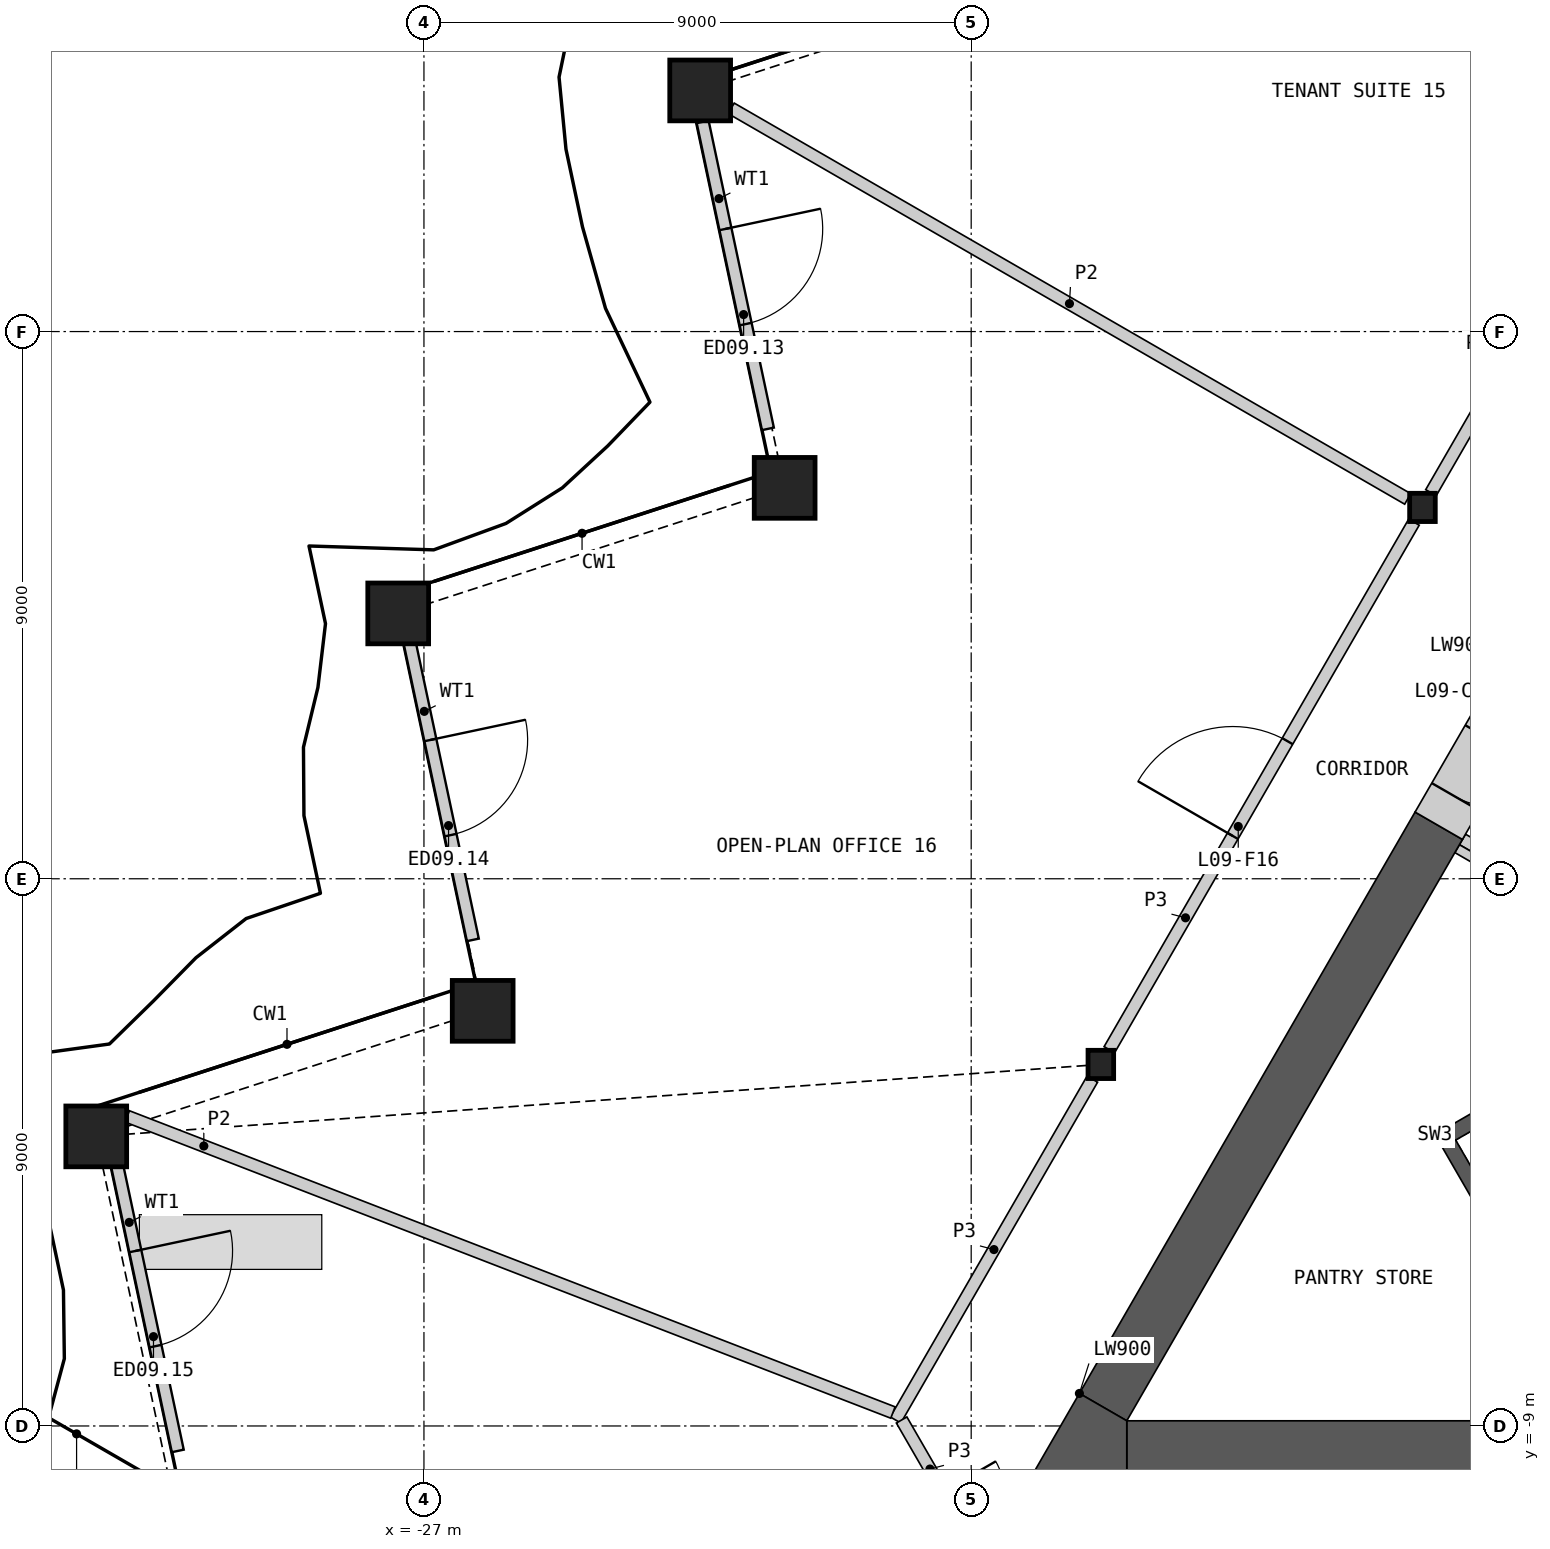
"""IFC4 building model, lengths in metres.
Left out: names, types, materials, properties, quantities, classifications, styles, units other than length and angle.
Written with IfcOpenShell. Run it as: python <this file> out.ifc"""

import sys

from ifc_helpers import new_model, si_unit, direction, frame, frame_2d, origin, origin_2d, place, context, subcontext, project, spatial, polyline, rectangle, hollow_rectangle, i_section, outline, extrude, element, fill, save


model = new_model("IFC4")
c1 = context("Model", 3, precision=1e-05, world=origin(), true_north=direction((0.0, 1.0)))
c2 = subcontext(c1, "Body", "Model", "MODEL_VIEW")
j1 = project(units=[si_unit("LENGTHUNIT", "METRE"), si_unit("PLANEANGLEUNIT", "RADIAN")], contexts=[c1])
p1 = place(None, origin())
s1 = spatial("IfcSite", under=j1, at=p1, CompositionType="ELEMENT")
p2 = place(p1, origin())
s2 = spatial("IfcBuilding", under=s1, at=p2, CompositionType="ELEMENT")
p3 = place(p2, frame((0.0, 0.0, 46.8)))
s3 = spatial("IfcBuildingStorey", under=s2, at=p3, CompositionType="ELEMENT", Elevation=46.8)
for number, where, z_axis, x_axis in (
    (1, (-22.457, 12.966, 0.0), (0.0, 0.0, 1.0), (1.0, 0.0, 0.0)),
    (2, (-21.068, 6.429, 0.0), (0.0, 0.0, 1.0), (1.0, 0.0, 0.0)),
    (3, (-27.423, 4.364, 0.0), (0.0, 0.0, 1.0), (1.0, 0.0, 0.0)),
    (4, (-26.034, -2.172, 0.0), (0.0, 0.0, 1.0), (1.0, 0.0, 0.0)),
    (5, (-32.389, -4.237, 0.0), (0.0, 0.0, 1.0), (1.0, 0.0, 0.0)),
):
    element("IfcColumn", number, at=place(p3, frame(where, z_axis=z_axis, x_axis=x_axis)), inside=s3, PredefinedType="COLUMN", context=c2, shape_type="SweptSolid", body=[
        extrude(hollow_rectangle(XDim=1.0, YDim=1.0, WallThickness=0.07, at=origin_2d()), origin(), (0.0, 0.0, 1.0), 4.2),
    ])
for number, where, z_axis, x_axis in (
    (6, (-10.578, 6.107, 0.0), (0.0, 0.0, 1.0), (1.0, 0.0, 0.0)),
    (7, (-15.868, -3.054, 0.0), (0.0, 0.0, 1.0), (1.0, 0.0, 0.0)),
):
    element("IfcColumn", number, at=place(p3, frame(where, z_axis=z_axis, x_axis=x_axis)), inside=s3, PredefinedType="COLUMN", context=c2, shape_type="SweptSolid", body=[
        extrude(i_section(OverallWidth=0.421, OverallDepth=0.465, WebThickness=0.045, FlangeThickness=0.072, at=origin_2d()), origin(), (0.0, 0.0, 1.0), 4.2),
    ])
p4 = place(p3, frame((-22.416, 12.449, 0.0), z_axis=(0.0, 0.0, 1.0), x_axis=(0.207907400709, -0.978148512615, 0.0)))
e8 = element("IfcWall", 8, at=p4, inside=s3, PredefinedType="SOLIDWALL", context=c2, shape_type="SweptSolid", body=[
    extrude(rectangle(XDim=5.162, YDim=0.2, at=frame_2d((2.581, 0.0))), origin(), (0.0, 0.0, 1.0), 3.189),
])
p5 = place(p4, frame((1.8, 0.0, 0.0)))
e9 = element("IfcOpeningElement", 9, at=p5, cuts=e8, PredefinedType="OPENING", context=c2, shape_type="SweptSolid", body=[
    extrude(rectangle(XDim=1.6, YDim=2.4, at=frame_2d((0.8, 1.2))), frame((0.0, 0.11, 0.0), z_axis=(0.0, -1.0, 0.0), x_axis=(1.0, 0.0, 0.0)), (0.0, 0.0, 1.0), 0.22),
])
p6 = place(p3, frame((-27.261, 4.006, 0.0), z_axis=(0.0, 0.0, 1.0), x_axis=(0.207885539143, -0.978153159079, 0.0)))
e10 = element("IfcWall", 10, at=p6, inside=s3, PredefinedType="SOLIDWALL", context=c2, shape_type="SweptSolid", body=[
    extrude(rectangle(XDim=5.124, YDim=0.2, at=frame_2d((2.562, 0.0))), origin(), (0.0, 0.0, 1.0), 3.189),
])
p7 = place(p6, frame((1.762, 0.0, 0.0)))
e11 = element("IfcOpeningElement", 11, at=p7, cuts=e10, PredefinedType="OPENING", context=c2, shape_type="SweptSolid", body=[
    extrude(rectangle(XDim=1.6, YDim=2.4, at=frame_2d((0.8, 1.2))), frame((0.0, 0.11, 0.0), z_axis=(0.0, -1.0, 0.0), x_axis=(1.0, 0.0, 0.0)), (0.0, 0.0, 1.0), 0.22),
])
p8 = place(p3, frame((-32.114, -4.399, 0.0), z_axis=(0.0, 0.0, 1.0), x_axis=(0.207931126702, -0.978143469307, 0.0)))
e12 = element("IfcWall", 12, at=p8, inside=s3, PredefinedType="SOLIDWALL", context=c2, shape_type="SweptSolid", body=[
    extrude(rectangle(XDim=5.124, YDim=0.2, at=frame_2d((2.562, 0.0))), origin(), (0.0, 0.0, 1.0), 3.189),
])
p9 = place(p8, frame((1.762, 0.0, 0.0)))
e13 = element("IfcOpeningElement", 13, at=p9, cuts=e12, PredefinedType="OPENING", context=c2, shape_type="SweptSolid", body=[
    extrude(rectangle(XDim=1.6, YDim=2.4, at=frame_2d((0.8, 1.2))), frame((0.0, 0.11, 0.0), z_axis=(0.0, -1.0, 0.0), x_axis=(1.0, 0.0, 0.0)), (0.0, 0.0, 1.0), 0.22),
])
p10 = place(p3, frame((-8.181, -0.357, 0.0), z_axis=(0.0, 0.0, 1.0), x_axis=(-0.866035824272, 0.499981950752, 0.0)))
e14 = element("IfcWall", 14, at=p10, inside=s3, PredefinedType="SHEAR", context=c2, shape_type="SweptSolid", body=[
    extrude(rectangle(XDim=2.009, YDim=0.2, at=frame_2d((1.004, 0.0))), origin(), (0.0, 0.0, 1.0), 3.8),
])
p11 = place(p3, origin())
e15 = element("IfcWall", 15, at=p11, inside=s3, PredefinedType="SHEAR", context=c2, shape_type="SweptSolid", body=[
    extrude(outline(polyline([(-5.307, -1.281), (-10.374, -4.206), (-10.032, -4.298), (-5.182, -1.498), (-5.307, -1.281)])), origin(), (0.0, 0.0, 1.0), 3.8),
])
p12 = place(p3, origin())
e16 = element("IfcWall", 16, at=p12, inside=s3, PredefinedType="SHEAR", context=c2, shape_type="SweptSolid", body=[
    extrude(outline(polyline([(-10.374, -4.206), (-8.83, -6.881), (-8.738, -6.539), (-10.032, -4.298), (-10.374, -4.206)])), origin(), (0.0, 0.0, 1.0), 3.8),
])
p13 = place(p3, frame((-8.268, -0.509, 0.0), z_axis=(0.0, 0.0, 1.0), x_axis=(-0.866035824272, 0.499981950752, 0.0)))
e17 = element("IfcWall", 17, at=p13, inside=s3, PredefinedType="PARTITIONING", context=c2, shape_type="SweptSolid", body=[
    extrude(rectangle(XDim=2.009, YDim=0.15, at=frame_2d((1.004, 0.0))), origin(), (0.0, 0.0, 1.0), 3.8),
])
p14 = place(p3, frame((-15.441, -9.365, 0.0), z_axis=(0.0, 0.0, 1.0), x_axis=(1.0, 0.0, 0.0)))
e18 = element("IfcWall", 18, at=p14, inside=s3, PredefinedType="SHEAR", context=c2, shape_type="SweptSolid", body=[
    extrude(rectangle(XDim=8.871, YDim=0.9, at=frame_2d((4.435, 0.0))), origin(), (0.0, 0.0, 1.0), 3.8),
])
p15 = place(p3, frame((-10.31, 0.872, 0.0), z_axis=(0.0, 0.0, 1.0), x_axis=(-0.499991697393, -0.866030197244, 0.0)))
e19 = element("IfcWall", 19, at=p15, inside=s3, PredefinedType="SHEAR", context=c2, shape_type="SweptSolid", body=[
    extrude(rectangle(XDim=11.041, YDim=0.9, at=frame_2d((5.521, 0.0))), origin(), (0.0, 0.0, 1.0), 3.8),
])
p16 = place(p3, origin())
e20 = element("IfcWall", 20, at=p16, inside=s3, PredefinedType="SHEAR", context=c2, shape_type="SweptSolid", body=[
    extrude(outline(polyline([(-16.221, -8.465), (-15.441, -8.915), (-15.441, -9.815), (-17.0, -9.815), (-16.221, -8.465)])), origin(), (0.0, 0.0, 1.0), 3.8),
])
p17 = place(p3, frame((-9.21, 2.777, 0.0), z_axis=(0.0, 0.0, 1.0), x_axis=(-0.500077893725, -0.86598042715, 0.0)))
e21 = element("IfcWall", 21, at=p17, inside=s3, PredefinedType="SHEAR", context=c2, shape_type="SweptSolid", body=[
    extrude(rectangle(XDim=2.2, YDim=0.9, at=frame_2d((1.1, 0.0))), origin(), (0.0, 0.0, 1.0), 3.8),
])
p18 = place(p17, frame((0.55, 0.0, 0.0)))
e22 = element("IfcOpeningElement", 22, at=p18, cuts=e21, PredefinedType="OPENING", context=c2, shape_type="SweptSolid", body=[
    extrude(rectangle(XDim=1.1, YDim=2.1, at=frame_2d((0.55, 1.05))), frame((0.0, 0.46, 0.0), z_axis=(0.0, -1.0, 0.0), x_axis=(1.0, 0.0, 0.0)), (0.0, 0.0, 1.0), 0.92),
])
p19 = place(p3, frame((-10.439, 6.35, 0.0), z_axis=(0.0, 0.0, 1.0), x_axis=(0.50001002959, 0.86601961312, 0.0)))
e23 = element("IfcWall", 23, at=p19, inside=s3, PredefinedType="PARTITIONING", context=c2, shape_type="SweptSolid", body=[
    extrude(rectangle(XDim=10.019, YDim=0.2, at=frame_2d((5.009, 0.0))), origin(), (0.0, 0.0, 1.0), 3.8),
])
p20 = place(p19, frame((4.159, 0.0, 0.0)))
e24 = element("IfcOpeningElement", 24, at=p20, cuts=e23, PredefinedType="OPENING", context=c2, shape_type="SweptSolid", body=[
    extrude(rectangle(XDim=1.0, YDim=2.1, at=frame_2d((0.5, 1.05))), frame((0.0, 0.11, 0.0), z_axis=(0.0, -1.0, 0.0), x_axis=(1.0, 0.0, 0.0)), (0.0, 0.0, 1.0), 0.22),
])
p21 = place(p3, frame((-15.728, -2.811, 0.0), z_axis=(0.0, 0.0, 1.0), x_axis=(0.49999175339, 0.866030164915, 0.0)))
e25 = element("IfcWall", 25, at=p21, inside=s3, PredefinedType="PARTITIONING", context=c2, shape_type="SweptSolid", body=[
    extrude(rectangle(XDim=10.019, YDim=0.2, at=frame_2d((5.009, 0.0))), origin(), (0.0, 0.0, 1.0), 3.8),
])
p22 = place(p21, frame((4.059, 0.0, 0.0)))
e26 = element("IfcOpeningElement", 26, at=p22, cuts=e25, PredefinedType="OPENING", context=c2, shape_type="SweptSolid", body=[
    extrude(rectangle(XDim=1.8, YDim=2.1, at=frame_2d((0.9, 1.05))), frame((0.0, 0.11, 0.0), z_axis=(0.0, -1.0, 0.0), x_axis=(1.0, 0.0, 0.0)), (0.0, 0.0, 1.0), 0.22),
])
p23 = place(p3, frame((-19.244, -8.902, 0.0), z_axis=(0.0, 0.0, 1.0), x_axis=(0.499984737558, 0.86603421538, 0.0)))
e27 = element("IfcWall", 27, at=p23, inside=s3, PredefinedType="PARTITIONING", context=c2, shape_type="SweptSolid", body=[
    extrude(rectangle(XDim=6.473, YDim=0.2, at=frame_2d((3.236, 0.0))), origin(), (0.0, 0.0, 1.0), 3.8),
])
p24 = place(p3, frame((-19.144, -8.902, 0.0), z_axis=(0.0, 0.0, 1.0), x_axis=(0.499958791762, -0.866049194065, 0.0)))
e28 = element("IfcWall", 28, at=p24, inside=s3, PredefinedType="PARTITIONING", context=c2, shape_type="SweptSolid", body=[
    extrude(rectangle(XDim=3.726, YDim=0.2, at=frame_2d((1.863, 0.0))), origin(), (0.0, 0.0, 1.0), 3.8),
])
p25 = place(p24, frame((1.363, 0.0, 0.0)))
e29 = element("IfcOpeningElement", 29, at=p25, cuts=e28, PredefinedType="OPENING", context=c2, shape_type="SweptSolid", body=[
    extrude(rectangle(XDim=1.0, YDim=2.1, at=frame_2d((0.5, 1.05))), frame((0.0, 0.11, 0.0), z_axis=(0.0, -1.0, 0.0), x_axis=(1.0, 0.0, 0.0)), (0.0, 0.0, 1.0), 0.22),
])
p26 = place(p3, frame((-31.879, -3.908, 0.0), z_axis=(0.0, 0.0, 1.0), x_axis=(0.932669586354, -0.360731815467, 0.0)))
e30 = element("IfcWall", 30, at=p26, inside=s3, PredefinedType="PARTITIONING", context=c2, shape_type="SweptSolid", body=[
    extrude(rectangle(XDim=13.501, YDim=0.2, at=frame_2d((6.75, 0.0))), origin(), (0.0, 0.0, 1.0), 2.885),
])
p27 = place(p3, frame((-21.947, 12.671, 0.0), z_axis=(0.0, 0.0, 1.0), x_axis=(0.866026729935, -0.499997703033, 0.0)))
e31 = element("IfcWall", 31, at=p27, inside=s3, PredefinedType="PARTITIONING", context=c2, shape_type="SweptSolid", body=[
    extrude(rectangle(XDim=12.848, YDim=0.2, at=frame_2d((6.424, 0.0))), origin(), (0.0, 0.0, 1.0), 2.885),
])
p28 = place(p5, origin())
e32 = element("IfcDoor", 32, at=p28, inside=s3, OperationType="DOUBLE_DOOR_SINGLE_SWING", PredefinedType="DOOR", context=c2, shape_type="SweptSolid", body=[
    extrude(rectangle(XDim=1.6, YDim=2.4, at=frame_2d((0.8, 1.2))), frame((0.0, 0.025, 0.0), z_axis=(0.0, -1.0, 0.0), x_axis=(1.0, 0.0, 0.0)), (0.0, 0.0, 1.0), 0.05),
])
fill(e9, e32)
p29 = place(p7, origin())
e33 = element("IfcDoor", 33, at=p29, inside=s3, OperationType="DOUBLE_DOOR_SINGLE_SWING", PredefinedType="DOOR", context=c2, shape_type="SweptSolid", body=[
    extrude(rectangle(XDim=1.6, YDim=2.4, at=frame_2d((0.8, 1.2))), frame((0.0, 0.025, 0.0), z_axis=(0.0, -1.0, 0.0), x_axis=(1.0, 0.0, 0.0)), (0.0, 0.0, 1.0), 0.05),
])
fill(e11, e33)
p30 = place(p9, origin())
e34 = element("IfcDoor", 34, at=p30, inside=s3, OperationType="DOUBLE_DOOR_SINGLE_SWING", PredefinedType="DOOR", context=c2, shape_type="SweptSolid", body=[
    extrude(rectangle(XDim=1.6, YDim=2.4, at=frame_2d((0.8, 1.2))), frame((0.0, 0.025, 0.0), z_axis=(0.0, -1.0, 0.0), x_axis=(1.0, 0.0, 0.0)), (0.0, 0.0, 1.0), 0.05),
])
fill(e13, e34)
p31 = place(p18, origin())
e35 = element("IfcDoor", 35, at=p31, inside=s3, OperationType="SINGLE_SWING_LEFT", PredefinedType="DOOR", context=c2, shape_type="SweptSolid", body=[
    extrude(rectangle(XDim=1.1, YDim=2.1, at=frame_2d((0.55, 1.05))), frame((0.0, 0.205, 0.0), z_axis=(0.0, -1.0, 0.0), x_axis=(1.0, 0.0, 0.0)), (0.0, 0.0, 1.0), 0.05),
])
fill(e22, e35)
p32 = place(p22, origin())
e36 = element("IfcDoor", 36, at=p32, inside=s3, OperationType="DOUBLE_DOOR_SINGLE_SWING", PredefinedType="DOOR", context=c2, shape_type="SweptSolid", body=[
    extrude(rectangle(XDim=1.8, YDim=2.1, at=frame_2d((0.9, 1.05))), frame((0.0, 0.025, 0.0), z_axis=(0.0, -1.0, 0.0), x_axis=(1.0, 0.0, 0.0)), (0.0, 0.0, 1.0), 0.05),
])
fill(e26, e36)
save(model, sys.argv[1])
